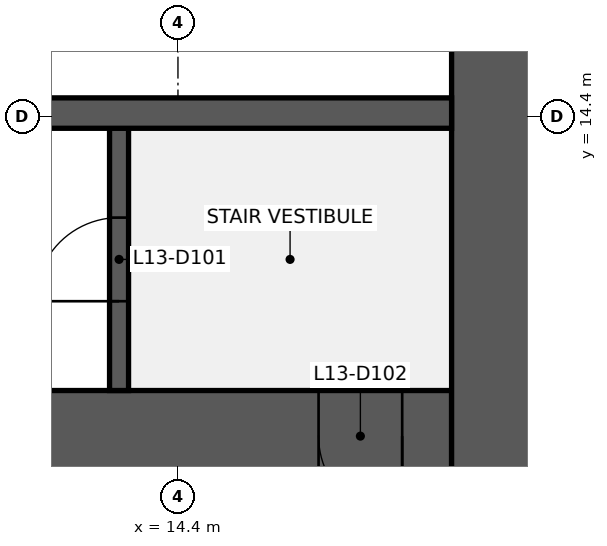
"""IFC4 building model, lengths in metres.
Left out: names, types, materials, properties, quantities, classifications, styles, units other than length and angle.
Written with IfcOpenShell. Run it as: python <this file> out.ifc"""

import sys

from ifc_helpers import new_model, si_unit, direction, frame, frame_2d, origin, place, context, subcontext, project, spatial, rectangle, extrude, element, fill, save


model = new_model("IFC4")
c1 = context("Model", 3, precision=1e-05, world=origin(), true_north=direction((0.0, 1.0)))
c2 = subcontext(c1, "Body", "Model", "MODEL_VIEW")
j1 = project(units=[si_unit("LENGTHUNIT", "METRE"), si_unit("PLANEANGLEUNIT", "RADIAN")], contexts=[c1])
p1 = place(None, origin())
s1 = spatial("IfcSite", under=j1, at=p1, CompositionType="ELEMENT")
p2 = place(p1, origin())
s2 = spatial("IfcBuilding", under=s1, at=p2, CompositionType="ELEMENT")
p3 = place(p2, frame((0.0, 0.0, 63.0)))
s3 = spatial("IfcBuildingStorey", under=s2, at=p3, CompositionType="ELEMENT", Elevation=63.0)
p4 = place(p3, frame((18.0, 10.2, 0.0), z_axis=(0.0, 0.0, 1.0), x_axis=(-1.0, 0.0, 0.0)))
e1 = element("IfcWall", 1, at=p4, inside=s3, PredefinedType="SHEAR", context=c2, shape_type="SweptSolid", body=[
    extrude(rectangle(XDim=13.2, YDim=1.2, at=frame_2d((6.6, 0.0))), origin(), (0.0, 0.0, 1.0), 3.84),
])
p5 = place(p4, frame((0.65, 0.0, 0.0)))
e2 = element("IfcOpeningElement", 2, at=p5, cuts=e1, PredefinedType="OPENING", context=c2, shape_type="SweptSolid", body=[
    extrude(rectangle(XDim=1.1, YDim=2.1, at=frame_2d((0.55, 1.05))), frame((0.0, 0.61, 0.0), z_axis=(0.0, -1.0, 0.0), x_axis=(1.0, 0.0, 0.0)), (0.0, 0.0, 1.0), 1.22),
])
p6 = place(p3, frame((18.6, 38.4, 0.0), z_axis=(0.0, 0.0, 1.0), x_axis=(0.0, -1.0, 0.0)))
e3 = element("IfcWall", 3, at=p6, inside=s3, PredefinedType="SHEAR", context=c2, shape_type="SweptSolid", body=[
    extrude(rectangle(XDim=28.8, YDim=1.2, at=frame_2d((14.4, 0.0))), origin(), (0.0, 0.0, 1.0), 3.84),
])
p7 = place(p6, frame((18.3, 0.0, 0.0)))
e4 = element("IfcOpeningElement", 4, at=p7, cuts=e3, PredefinedType="OPENING", context=c2, shape_type="SweptSolid", body=[
    extrude(rectangle(XDim=1.8, YDim=2.1, at=frame_2d((0.9, 1.05))), frame((0.0, 0.61, 0.0), z_axis=(0.0, -1.0, 0.0), x_axis=(1.0, 0.0, 0.0)), (0.0, 0.0, 1.0), 1.22),
])
p8 = place(p6, frame((8.7, 0.0, 0.0)))
e5 = element("IfcOpeningElement", 5, at=p8, cuts=e3, PredefinedType="OPENING", context=c2, shape_type="SweptSolid", body=[
    extrude(rectangle(XDim=1.8, YDim=2.1, at=frame_2d((0.9, 1.05))), frame((0.0, 0.61, 0.0), z_axis=(0.0, -1.0, 0.0), x_axis=(1.0, 0.0, 0.0)), (0.0, 0.0, 1.0), 1.22),
])
p9 = place(p3, frame((13.625, 10.8, 0.0), z_axis=(0.0, 0.0, 1.0), x_axis=(0.0, 1.0, 0.0)))
e6 = element("IfcWall", 6, at=p9, inside=s3, PredefinedType="SHEAR", context=c2, shape_type="SweptSolid", body=[
    extrude(rectangle(XDim=3.45, YDim=0.25, at=frame_2d((1.725, 0.0))), origin(), (0.0, 0.0, 1.0), 3.84),
])
p10 = place(p9, frame((1.175, 0.0, 0.0)))
e7 = element("IfcOpeningElement", 7, at=p10, cuts=e6, PredefinedType="OPENING", context=c2, shape_type="SweptSolid", body=[
    extrude(rectangle(XDim=1.1, YDim=2.1, at=frame_2d((0.55, 1.05))), frame((0.0, 0.135, 0.0), z_axis=(0.0, -1.0, 0.0), x_axis=(1.0, 0.0, 0.0)), (0.0, 0.0, 1.0), 0.27),
])
p11 = place(p3, frame((1.2, 14.45, 0.0), z_axis=(0.0, 0.0, 1.0), x_axis=(1.0, 0.0, 0.0)))
e8 = element("IfcWall", 8, at=p11, inside=s3, PredefinedType="SHEAR", context=c2, shape_type="SweptSolid", body=[
    extrude(rectangle(XDim=16.8, YDim=0.4, at=frame_2d((8.4, 0.0))), origin(), (0.0, 0.0, 1.0), 3.84),
])
p12 = place(p10, origin())
e9 = element("IfcDoor", 9, at=p12, inside=s3, OperationType="SINGLE_SWING_LEFT", PredefinedType="DOOR", context=c2, shape_type="SweptSolid", body=[
    extrude(rectangle(XDim=1.1, YDim=2.1, at=frame_2d((0.55, 1.05))), frame((0.0, 0.025, 0.0), z_axis=(0.0, -1.0, 0.0), x_axis=(1.0, 0.0, 0.0)), (0.0, 0.0, 1.0), 0.05),
])
fill(e7, e9)
p13 = place(p5, origin())
e10 = element("IfcDoor", 10, at=p13, inside=s3, OperationType="SINGLE_SWING_LEFT", PredefinedType="DOOR", context=c2, shape_type="SweptSolid", body=[
    extrude(rectangle(XDim=1.1, YDim=2.1, at=frame_2d((0.55, 1.05))), frame((0.0, 0.025, 0.0), z_axis=(0.0, -1.0, 0.0), x_axis=(1.0, 0.0, 0.0)), (0.0, 0.0, 1.0), 0.05),
])
fill(e2, e10)
save(model, sys.argv[1])
